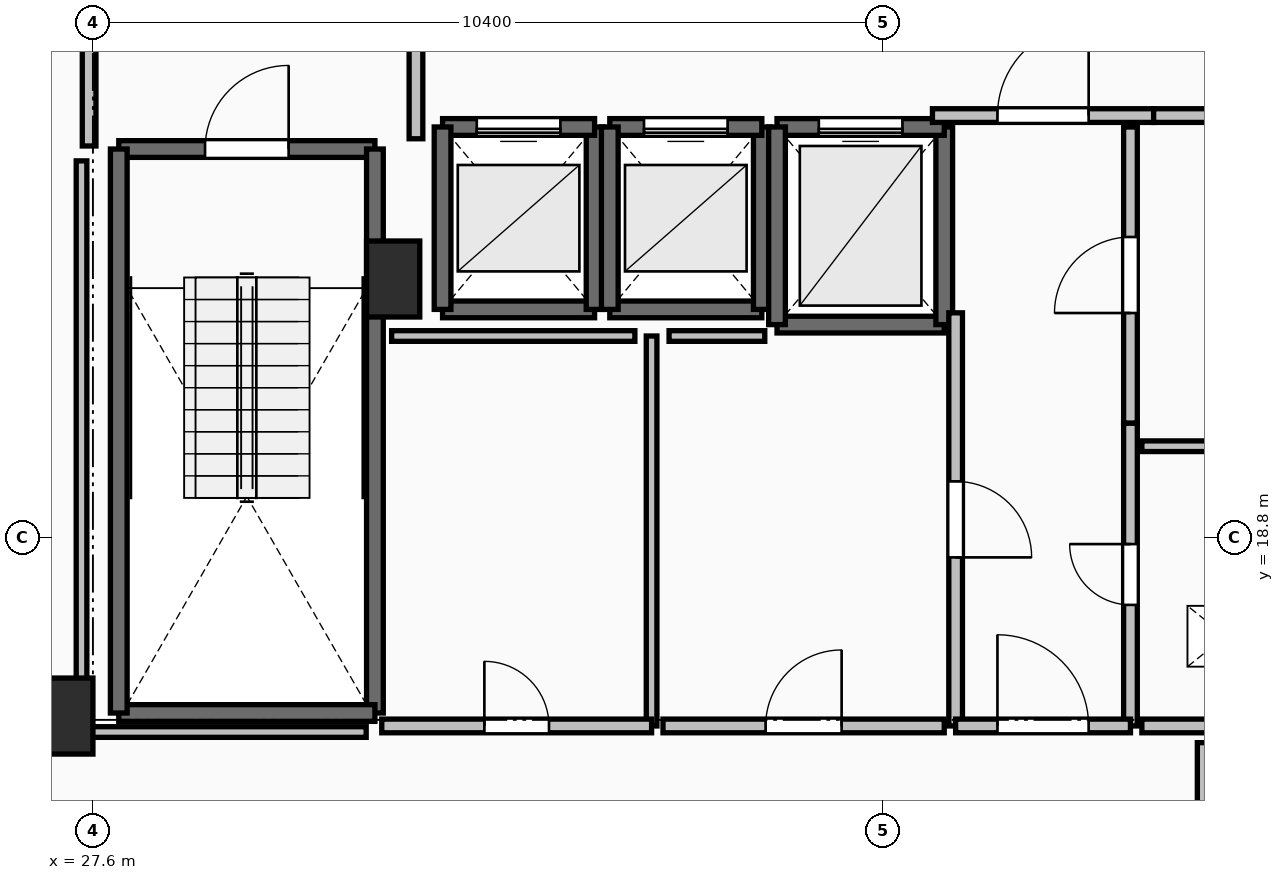
"""IFC4 building model, lengths in metres.
Left out: names, types, materials, properties, quantities, classifications, styles, units other than length and angle.
Written with IfcOpenShell. Run it as: python <this file> out.ifc"""

import sys

from ifc_helpers import new_model, si_unit, direction, frame, frame_2d, origin, origin_2d, place, context, subcontext, project, spatial, rectangle, extrude, element, fill, save


model = new_model("IFC4")
c1 = context("Model", 3, precision=1e-05, world=origin(), true_north=direction((0.0, 1.0)))
c2 = subcontext(c1, "Body", "Model", "MODEL_VIEW")
j1 = project(units=[si_unit("LENGTHUNIT", "METRE"), si_unit("PLANEANGLEUNIT", "RADIAN")], contexts=[c1])
p1 = place(None, origin())
s1 = spatial("IfcSite", under=j1, at=p1, CompositionType="ELEMENT")
p2 = place(p1, origin())
s2 = spatial("IfcBuilding", under=s1, at=p2, CompositionType="ELEMENT")
p3 = place(p2, frame((0.0, 0.0, 214.3)))
s3 = spatial("IfcBuildingStorey", under=s2, at=p3, CompositionType="ELEMENT", Elevation=214.3)
for number, where, z_axis, x_axis in (
    (1, (27.25, 16.45, 0.0), (0.0, 0.0, 1.0), (1.0, 0.0, 0.0)),
    (2, (31.55, 22.2, 0.0), (0.0, 0.0, 1.0), (1.0, 0.0, 0.0)),
):
    element("IfcColumn", number, at=place(p3, frame(where, z_axis=z_axis, x_axis=x_axis)), inside=s3, PredefinedType="PILASTER", context=c2, shape_type="SweptSolid", body=[
        extrude(rectangle(XDim=0.7, YDim=1.0, at=origin_2d()), origin(), (0.0, 0.0, 1.0), 3.55),
    ])
p4 = place(p3, frame((27.94, 23.91, 0.0), z_axis=(0.0, 0.0, 1.0), x_axis=(1.0, 0.0, 0.0)))
e3 = element("IfcWall", 3, at=p4, inside=s3, PredefinedType="SOLIDWALL", context=c2, shape_type="SweptSolid", body=[
    extrude(rectangle(XDim=3.37, YDim=0.22, at=frame_2d((1.685, 0.0))), origin(), (0.0, 0.0, 1.0), 3.29),
])
p5 = place(p4, frame((1.135, 0.0, 0.0)))
e4 = element("IfcOpeningElement", 4, at=p5, cuts=e3, PredefinedType="OPENING", context=c2, shape_type="SweptSolid", body=[
    extrude(rectangle(XDim=1.1, YDim=2.15, at=frame_2d((0.55, 1.075))), frame((0.0, 0.125, 0.0), z_axis=(0.0, -1.0, 0.0), x_axis=(1.0, 0.0, 0.0)), (0.0, 0.0, 1.0), 0.25),
])
p6 = place(p3, frame((31.31, 23.91, 0.0), z_axis=(0.0, 0.0, 1.0), x_axis=(0.0, -1.0, 0.0)))
e5 = element("IfcWall", 5, at=p6, inside=s3, PredefinedType="SOLIDWALL", context=c2, shape_type="SweptSolid", body=[
    extrude(rectangle(XDim=7.42, YDim=0.22, at=frame_2d((3.71, 0.0))), origin(), (0.0, 0.0, 1.0), 3.29),
])
p7 = place(p3, frame((31.31, 16.49, 0.0), z_axis=(0.0, 0.0, 1.0), x_axis=(-1.0, 0.0, 0.0)))
e6 = element("IfcWall", 6, at=p7, inside=s3, PredefinedType="SOLIDWALL", context=c2, shape_type="SweptSolid", body=[
    extrude(rectangle(XDim=3.37, YDim=0.22, at=frame_2d((1.685, 0.0))), origin(), (0.0, 0.0, 1.0), 3.29),
])
p8 = place(p3, frame((27.94, 16.49, 0.0), z_axis=(0.0, 0.0, 1.0), x_axis=(0.0, 1.0, 0.0)))
e7 = element("IfcWall", 7, at=p8, inside=s3, PredefinedType="SOLIDWALL", context=c2, shape_type="SweptSolid", body=[
    extrude(rectangle(XDim=7.42, YDim=0.22, at=frame_2d((3.71, 0.0))), origin(), (0.0, 0.0, 1.0), 3.29),
])
p9 = place(p3, frame((32.2, 21.8, 0.0), z_axis=(0.0, 0.0, 1.0), x_axis=(1.0, 0.0, 0.0)))
e8 = element("IfcWall", 8, at=p9, inside=s3, PredefinedType="SOLIDWALL", context=c2, shape_type="SweptSolid", body=[
    extrude(rectangle(XDim=2.0, YDim=0.22, at=frame_2d((1.0, 0.0))), origin(), (0.0, 0.0, 1.0), 3.29),
])
p10 = place(p3, frame((34.2, 21.8, 0.0), z_axis=(0.0, 0.0, 1.0), x_axis=(0.0, 1.0, 0.0)))
e9 = element("IfcWall", 9, at=p10, inside=s3, PredefinedType="SOLIDWALL", context=c2, shape_type="SweptSolid", body=[
    extrude(rectangle(XDim=2.4, YDim=0.22, at=frame_2d((1.2, 0.0))), origin(), (0.0, 0.0, 1.0), 3.29),
])
p11 = place(p3, frame((34.2, 24.2, 0.0), z_axis=(0.0, 0.0, 1.0), x_axis=(-1.0, 0.0, 0.0)))
e10 = element("IfcWall", 10, at=p11, inside=s3, PredefinedType="SOLIDWALL", context=c2, shape_type="SweptSolid", body=[
    extrude(rectangle(XDim=2.0, YDim=0.22, at=frame_2d((1.0, 0.0))), origin(), (0.0, 0.0, 1.0), 3.29),
])
p12 = place(p11, frame((0.45, 0.0, 0.0)))
e11 = element("IfcOpeningElement", 11, at=p12, cuts=e10, PredefinedType="OPENING", context=c2, shape_type="SweptSolid", body=[
    extrude(rectangle(XDim=1.1, YDim=2.2, at=frame_2d((0.55, 1.1))), frame((0.0, 0.125, 0.0), z_axis=(0.0, -1.0, 0.0), x_axis=(1.0, 0.0, 0.0)), (0.0, 0.0, 1.0), 0.25),
])
p13 = place(p3, frame((32.2, 24.2, 0.0), z_axis=(0.0, 0.0, 1.0), x_axis=(0.0, -1.0, 0.0)))
e12 = element("IfcWall", 12, at=p13, inside=s3, PredefinedType="SOLIDWALL", context=c2, shape_type="SweptSolid", body=[
    extrude(rectangle(XDim=2.4, YDim=0.22, at=frame_2d((1.2, 0.0))), origin(), (0.0, 0.0, 1.0), 3.29),
])
p14 = place(p3, frame((34.4, 21.8, 0.0), z_axis=(0.0, 0.0, 1.0), x_axis=(1.0, 0.0, 0.0)))
e13 = element("IfcWall", 13, at=p14, inside=s3, PredefinedType="SOLIDWALL", context=c2, shape_type="SweptSolid", body=[
    extrude(rectangle(XDim=2.0, YDim=0.22, at=frame_2d((1.0, 0.0))), origin(), (0.0, 0.0, 1.0), 3.29),
])
p15 = place(p3, frame((36.4, 21.8, 0.0), z_axis=(0.0, 0.0, 1.0), x_axis=(0.0, 1.0, 0.0)))
e14 = element("IfcWall", 14, at=p15, inside=s3, PredefinedType="SOLIDWALL", context=c2, shape_type="SweptSolid", body=[
    extrude(rectangle(XDim=2.4, YDim=0.22, at=frame_2d((1.2, 0.0))), origin(), (0.0, 0.0, 1.0), 3.29),
])
p16 = place(p3, frame((36.4, 24.2, 0.0), z_axis=(0.0, 0.0, 1.0), x_axis=(-1.0, 0.0, 0.0)))
e15 = element("IfcWall", 15, at=p16, inside=s3, PredefinedType="SOLIDWALL", context=c2, shape_type="SweptSolid", body=[
    extrude(rectangle(XDim=2.0, YDim=0.22, at=frame_2d((1.0, 0.0))), origin(), (0.0, 0.0, 1.0), 3.29),
])
p17 = place(p16, frame((0.45, 0.0, 0.0)))
e16 = element("IfcOpeningElement", 16, at=p17, cuts=e15, PredefinedType="OPENING", context=c2, shape_type="SweptSolid", body=[
    extrude(rectangle(XDim=1.1, YDim=2.2, at=frame_2d((0.55, 1.1))), frame((0.0, 0.125, 0.0), z_axis=(0.0, -1.0, 0.0), x_axis=(1.0, 0.0, 0.0)), (0.0, 0.0, 1.0), 0.25),
])
p18 = place(p3, frame((34.4, 24.2, 0.0), z_axis=(0.0, 0.0, 1.0), x_axis=(0.0, -1.0, 0.0)))
e17 = element("IfcWall", 17, at=p18, inside=s3, PredefinedType="SOLIDWALL", context=c2, shape_type="SweptSolid", body=[
    extrude(rectangle(XDim=2.4, YDim=0.22, at=frame_2d((1.2, 0.0))), origin(), (0.0, 0.0, 1.0), 3.29),
])
p19 = place(p3, frame((36.6, 21.6, 0.0), z_axis=(0.0, 0.0, 1.0), x_axis=(1.0, 0.0, 0.0)))
e18 = element("IfcWall", 18, at=p19, inside=s3, PredefinedType="SOLIDWALL", context=c2, shape_type="SweptSolid", body=[
    extrude(rectangle(XDim=2.2, YDim=0.22, at=frame_2d((1.1, 0.0))), origin(), (0.0, 0.0, 1.0), 3.29),
])
p20 = place(p3, frame((38.8, 21.6, 0.0), z_axis=(0.0, 0.0, 1.0), x_axis=(0.0, 1.0, 0.0)))
e19 = element("IfcWall", 19, at=p20, inside=s3, PredefinedType="SOLIDWALL", context=c2, shape_type="SweptSolid", body=[
    extrude(rectangle(XDim=2.6, YDim=0.22, at=frame_2d((1.3, 0.0))), origin(), (0.0, 0.0, 1.0), 3.29),
])
p21 = place(p3, frame((38.8, 24.2, 0.0), z_axis=(0.0, 0.0, 1.0), x_axis=(-1.0, 0.0, 0.0)))
e20 = element("IfcWall", 20, at=p21, inside=s3, PredefinedType="SOLIDWALL", context=c2, shape_type="SweptSolid", body=[
    extrude(rectangle(XDim=2.2, YDim=0.22, at=frame_2d((1.1, 0.0))), origin(), (0.0, 0.0, 1.0), 3.29),
])
p22 = place(p21, frame((0.55, 0.0, 0.0)))
e21 = element("IfcOpeningElement", 21, at=p22, cuts=e20, PredefinedType="OPENING", context=c2, shape_type="SweptSolid", body=[
    extrude(rectangle(XDim=1.1, YDim=2.2, at=frame_2d((0.55, 1.1))), frame((0.0, 0.125, 0.0), z_axis=(0.0, -1.0, 0.0), x_axis=(1.0, 0.0, 0.0)), (0.0, 0.0, 1.0), 0.25),
])
p23 = place(p3, frame((36.6, 24.2, 0.0), z_axis=(0.0, 0.0, 1.0), x_axis=(0.0, -1.0, 0.0)))
e22 = element("IfcWall", 22, at=p23, inside=s3, PredefinedType="SOLIDWALL", context=c2, shape_type="SweptSolid", body=[
    extrude(rectangle(XDim=2.6, YDim=0.22, at=frame_2d((1.3, 0.0))), origin(), (0.0, 0.0, 1.0), 3.29),
])
p24 = place(p3, frame((31.85, 24.045, 0.0), z_axis=(0.0, 0.0, 1.0), x_axis=(0.0, 1.0, 0.0)))
e23 = element("IfcWall", 23, at=p24, inside=s3, PredefinedType="PARTITIONING", context=c2, shape_type="SweptSolid", body=[
    extrude(rectangle(XDim=3.91, YDim=0.18, at=frame_2d((1.955, 0.0))), origin(), (0.0, 0.0, 1.0), 3.29),
])
p25 = place(p24, frame((1.355, 0.0, 0.0)))
e24 = element("IfcOpeningElement", 24, at=p25, cuts=e23, PredefinedType="OPENING", context=c2, shape_type="SweptSolid", body=[
    extrude(rectangle(XDim=1.2, YDim=2.15, at=frame_2d((0.6, 1.075))), frame((0.0, 0.105, 0.0), z_axis=(0.0, -1.0, 0.0), x_axis=(1.0, 0.0, 0.0)), (0.0, 0.0, 1.0), 0.21),
])
p26 = place(p3, frame((27.55, 28.0, 0.0), z_axis=(0.0, 0.0, 1.0), x_axis=(0.0, -1.0, 0.0)))
e25 = element("IfcWall", 25, at=p26, inside=s3, PredefinedType="PARTITIONING", context=c2, shape_type="SweptSolid", body=[
    extrude(rectangle(XDim=4.05, YDim=0.18, at=frame_2d((2.025, 0.0))), origin(), (0.0, 0.0, 1.0), 3.29),
])
p27 = place(p26, frame((1.425, 0.0, 0.0)))
e26 = element("IfcOpeningElement", 26, at=p27, cuts=e25, PredefinedType="OPENING", context=c2, shape_type="SweptSolid", body=[
    extrude(rectangle(XDim=1.2, YDim=2.15, at=frame_2d((0.6, 1.075))), frame((0.0, 0.105, 0.0), z_axis=(0.0, -1.0, 0.0), x_axis=(1.0, 0.0, 0.0)), (0.0, 0.0, 1.0), 0.21),
])
p28 = place(p3, frame((38.645, 24.35, 0.0), z_axis=(0.0, 0.0, 1.0), x_axis=(1.0, 0.0, 0.0)))
e27 = element("IfcWall", 27, at=p28, inside=s3, PredefinedType="PARTITIONING", context=c2, shape_type="SweptSolid", body=[
    extrude(rectangle(XDim=2.91, YDim=0.18, at=frame_2d((1.455, 0.0))), origin(), (0.0, 0.0, 1.0), 3.29),
])
p29 = place(p28, frame((0.855, 0.0, 0.0)))
e28 = element("IfcOpeningElement", 28, at=p29, cuts=e27, PredefinedType="OPENING", context=c2, shape_type="SweptSolid", body=[
    extrude(rectangle(XDim=1.2, YDim=2.15, at=frame_2d((0.6, 1.075))), frame((0.0, 0.105, 0.0), z_axis=(0.0, -1.0, 0.0), x_axis=(1.0, 0.0, 0.0)), (0.0, 0.0, 1.0), 0.21),
])
p30 = place(p3, frame((41.555, 24.35, 0.0), z_axis=(0.0, 0.0, 1.0), x_axis=(1.0, 0.0, 0.0)))
e29 = element("IfcWall", 29, at=p30, inside=s3, PredefinedType="PARTITIONING", context=c2, shape_type="SweptSolid", body=[
    extrude(rectangle(XDim=2.445, YDim=0.18, at=frame_2d((1.223, 0.0))), origin(), (0.0, 0.0, 1.0), 3.29),
])
p31 = place(p30, frame((0.722, 0.0, 0.0)))
e30 = element("IfcOpeningElement", 30, at=p31, cuts=e29, PredefinedType="OPENING", context=c2, shape_type="SweptSolid", body=[
    extrude(rectangle(XDim=1.0, YDim=2.15, at=frame_2d((0.5, 1.075))), frame((0.0, 0.105, 0.0), z_axis=(0.0, -1.0, 0.0), x_axis=(1.0, 0.0, 0.0)), (0.0, 0.0, 1.0), 0.21),
])
p32 = place(p3, frame((41.25, 16.32, 0.0), z_axis=(0.0, 0.0, 1.0), x_axis=(0.0, 1.0, 0.0)))
e31 = element("IfcWall", 31, at=p32, inside=s3, PredefinedType="PARTITIONING", context=c2, shape_type="SweptSolid", body=[
    extrude(rectangle(XDim=3.985, YDim=0.18, at=frame_2d((1.992, 0.0))), origin(), (0.0, 0.0, 1.0), 3.29),
])
p33 = place(p32, frame((1.593, 0.0, 0.0)))
e32 = element("IfcOpeningElement", 32, at=p33, cuts=e31, PredefinedType="OPENING", context=c2, shape_type="SweptSolid", body=[
    extrude(rectangle(XDim=0.8, YDim=2.05, at=frame_2d((0.4, 1.025))), frame((0.0, 0.105, 0.0), z_axis=(0.0, -1.0, 0.0), x_axis=(1.0, 0.0, 0.0)), (0.0, 0.0, 1.0), 0.21),
])
p34 = place(p3, frame((41.25, 20.305, 0.0), z_axis=(0.0, 0.0, 1.0), x_axis=(0.0, 1.0, 0.0)))
e33 = element("IfcWall", 33, at=p34, inside=s3, PredefinedType="PARTITIONING", context=c2, shape_type="SweptSolid", body=[
    extrude(rectangle(XDim=3.895, YDim=0.18, at=frame_2d((1.948, 0.0))), origin(), (0.0, 0.0, 1.0), 3.29),
])
p35 = place(p34, frame((1.448, 0.0, 0.0)))
e34 = element("IfcOpeningElement", 34, at=p35, cuts=e33, PredefinedType="OPENING", context=c2, shape_type="SweptSolid", body=[
    extrude(rectangle(XDim=1.0, YDim=2.15, at=frame_2d((0.5, 1.075))), frame((0.0, 0.105, 0.0), z_axis=(0.0, -1.0, 0.0), x_axis=(1.0, 0.0, 0.0)), (0.0, 0.0, 1.0), 0.21),
])
p36 = place(p3, frame((38.95, 21.755, 0.0), z_axis=(0.0, 0.0, 1.0), x_axis=(0.0, -1.0, 0.0)))
e35 = element("IfcWall", 35, at=p36, inside=s3, PredefinedType="PARTITIONING", context=c2, shape_type="SweptSolid", body=[
    extrude(rectangle(XDim=5.435, YDim=0.18, at=frame_2d((2.717, 0.0))), origin(), (0.0, 0.0, 1.0), 3.29),
])
p37 = place(p36, frame((2.218, 0.0, 0.0)))
e36 = element("IfcOpeningElement", 36, at=p37, cuts=e35, PredefinedType="OPENING", context=c2, shape_type="SweptSolid", body=[
    extrude(rectangle(XDim=1.0, YDim=2.15, at=frame_2d((0.5, 1.075))), frame((0.0, 0.105, 0.0), z_axis=(0.0, -1.0, 0.0), x_axis=(1.0, 0.0, 0.0)), (0.0, 0.0, 1.0), 0.21),
])
p38 = place(p3, frame((38.95, 16.32, 0.0), z_axis=(0.0, 0.0, 1.0), x_axis=(1.0, 0.0, 0.0)))
e37 = element("IfcWall", 37, at=p38, inside=s3, PredefinedType="PARTITIONING", context=c2, shape_type="SweptSolid", body=[
    extrude(rectangle(XDim=2.3, YDim=0.18, at=frame_2d((1.15, 0.0))), origin(), (0.0, 0.0, 1.0), 3.29),
])
p39 = place(p38, frame((0.55, 0.0, 0.0)))
e38 = element("IfcOpeningElement", 38, at=p39, cuts=e37, PredefinedType="OPENING", context=c2, shape_type="SweptSolid", body=[
    extrude(rectangle(XDim=1.2, YDim=2.15, at=frame_2d((0.6, 1.075))), frame((0.0, 0.105, 0.0), z_axis=(0.0, -1.0, 0.0), x_axis=(1.0, 0.0, 0.0)), (0.0, 0.0, 1.0), 0.21),
])
p40 = place(p3, frame((44.6, 20.0, 0.0), z_axis=(0.0, 0.0, 1.0), x_axis=(-1.0, 0.0, 0.0)))
e39 = element("IfcWall", 39, at=p40, inside=s3, PredefinedType="PARTITIONING", context=c2, shape_type="SweptSolid", body=[
    extrude(rectangle(XDim=3.2, YDim=0.14, at=frame_2d((1.6, 0.0))), origin(), (0.0, 0.0, 1.0), 3.29),
])
p41 = place(p3, frame((41.4, 16.32, 0.0), z_axis=(0.0, 0.0, 1.0), x_axis=(1.0, 0.0, 0.0)))
e40 = element("IfcWall", 40, at=p41, inside=s3, PredefinedType="PARTITIONING", context=c2, shape_type="SweptSolid", body=[
    extrude(rectangle(XDim=3.2, YDim=0.18, at=frame_2d((1.6, 0.0))), origin(), (0.0, 0.0, 1.0), 3.29),
])
p42 = place(p41, frame((1.2, 0.0, 0.0)))
e41 = element("IfcOpeningElement", 41, at=p42, cuts=e40, PredefinedType="OPENING", context=c2, shape_type="SweptSolid", body=[
    extrude(rectangle(XDim=0.8, YDim=2.05, at=frame_2d((0.4, 1.025))), frame((0.0, 0.105, 0.0), z_axis=(0.0, -1.0, 0.0), x_axis=(1.0, 0.0, 0.0)), (0.0, 0.0, 1.0), 0.21),
])
p43 = place(p3, frame((34.95, 16.32, 0.0), z_axis=(0.0, 0.0, 1.0), x_axis=(0.0, 1.0, 0.0)))
e42 = element("IfcWall", 42, at=p43, inside=s3, PredefinedType="PARTITIONING", context=c2, shape_type="SweptSolid", body=[
    extrude(rectangle(XDim=5.13, YDim=0.14, at=frame_2d((2.565, 0.0))), origin(), (0.0, 0.0, 1.0), 3.29),
])
p44 = place(p3, frame((31.4, 16.32, 0.0), z_axis=(0.0, 0.0, 1.0), x_axis=(1.0, 0.0, 0.0)))
e43 = element("IfcWall", 43, at=p44, inside=s3, PredefinedType="PARTITIONING", context=c2, shape_type="SweptSolid", body=[
    extrude(rectangle(XDim=3.55, YDim=0.18, at=frame_2d((1.775, 0.0))), origin(), (0.0, 0.0, 1.0), 3.29),
])
p45 = place(p44, frame((1.35, 0.0, 0.0)))
e44 = element("IfcOpeningElement", 44, at=p45, cuts=e43, PredefinedType="OPENING", context=c2, shape_type="SweptSolid", body=[
    extrude(rectangle(XDim=0.85, YDim=2.1, at=frame_2d((0.425, 1.05))), frame((0.0, 0.105, 0.0), z_axis=(0.0, -1.0, 0.0), x_axis=(1.0, 0.0, 0.0)), (0.0, 0.0, 1.0), 0.21),
])
p46 = place(p3, frame((35.1, 16.32, 0.0), z_axis=(0.0, 0.0, 1.0), x_axis=(1.0, 0.0, 0.0)))
e45 = element("IfcWall", 45, at=p46, inside=s3, PredefinedType="PARTITIONING", context=c2, shape_type="SweptSolid", body=[
    extrude(rectangle(XDim=3.7, YDim=0.18, at=frame_2d((1.85, 0.0))), origin(), (0.0, 0.0, 1.0), 3.29),
])
p47 = place(p46, frame((1.35, 0.0, 0.0)))
e46 = element("IfcOpeningElement", 46, at=p47, cuts=e45, PredefinedType="OPENING", context=c2, shape_type="SweptSolid", body=[
    extrude(rectangle(XDim=1.0, YDim=2.15, at=frame_2d((0.5, 1.075))), frame((0.0, 0.105, 0.0), z_axis=(0.0, -1.0, 0.0), x_axis=(1.0, 0.0, 0.0)), (0.0, 0.0, 1.0), 0.21),
])
p48 = place(p3, frame((34.73, 21.45, 0.0), z_axis=(0.0, 0.0, 1.0), x_axis=(-1.0, 0.0, 0.0)))
e47 = element("IfcWall", 47, at=p48, inside=s3, PredefinedType="PARTITIONING", context=c2, shape_type="SweptSolid", body=[
    extrude(rectangle(XDim=3.2, YDim=0.14, at=frame_2d((1.6, 0.0))), origin(), (0.0, 0.0, 1.0), 3.29),
])
p49 = place(p3, frame((36.439, 21.45, 0.0), z_axis=(0.0, 0.0, 1.0), x_axis=(-1.0, 0.0, 0.0)))
e48 = element("IfcWall", 48, at=p49, inside=s3, PredefinedType="PARTITIONING", context=c2, shape_type="SweptSolid", body=[
    extrude(rectangle(XDim=1.259, YDim=0.14, at=frame_2d((0.629, 0.0))), origin(), (0.0, 0.0, 1.0), 3.29),
])
p50 = place(p3, frame((27.45, 23.754, 0.0), z_axis=(0.0, 0.0, 1.0), x_axis=(0.0, -1.0, 0.0)))
e49 = element("IfcWall", 49, at=p50, inside=s3, PredefinedType="PARTITIONING", context=c2, shape_type="SweptSolid", body=[
    extrude(rectangle(XDim=7.514, YDim=0.14, at=frame_2d((3.757, 0.0))), origin(), (0.0, 0.0, 1.0), 2.482),
])
p51 = place(p3, frame((27.45, 16.24, 0.0), z_axis=(0.0, 0.0, 1.0), x_axis=(1.0, 0.0, 0.0)))
e50 = element("IfcWall", 50, at=p51, inside=s3, PredefinedType="PARTITIONING", context=c2, shape_type="SweptSolid", body=[
    extrude(rectangle(XDim=3.745, YDim=0.14, at=frame_2d((1.873, 0.0))), origin(), (0.0, 0.0, 1.0), 2.482),
])
p52 = place(p3, frame((42.2, 16.1, 0.0), z_axis=(0.0, 0.0, 1.0), x_axis=(0.0, -1.0, 0.0)))
e51 = element("IfcWall", 51, at=p52, inside=s3, PredefinedType="PARTITIONING", context=c2, shape_type="SweptSolid", body=[
    extrude(rectangle(XDim=1.83, YDim=0.14, at=frame_2d((0.915, 0.0))), origin(), (0.0, 0.0, 1.0), 2.979),
])
p53 = place(p5, origin())
e52 = element("IfcDoor", 52, at=p53, inside=s3, OperationType="SINGLE_SWING_RIGHT", PredefinedType="DOOR", context=c2, shape_type="SweptSolid", body=[
    extrude(rectangle(XDim=1.1, YDim=2.15, at=frame_2d((0.55, 1.075))), frame((0.0, 0.025, 0.0), z_axis=(0.0, -1.0, 0.0), x_axis=(1.0, 0.0, 0.0)), (0.0, 0.0, 1.0), 0.05),
])
fill(e4, e52)
p54 = place(p12, origin())
e53 = element("IfcDoor", 53, at=p54, inside=s3, OperationType="SLIDING_TO_LEFT", PredefinedType="DOOR", context=c2, shape_type="SweptSolid", body=[
    extrude(rectangle(XDim=1.1, YDim=2.2, at=frame_2d((0.55, 1.1))), frame((0.0, 0.025, 0.0), z_axis=(0.0, -1.0, 0.0), x_axis=(1.0, 0.0, 0.0)), (0.0, 0.0, 1.0), 0.05),
])
fill(e11, e53)
p55 = place(p17, origin())
e54 = element("IfcDoor", 54, at=p55, inside=s3, OperationType="SLIDING_TO_LEFT", PredefinedType="DOOR", context=c2, shape_type="SweptSolid", body=[
    extrude(rectangle(XDim=1.1, YDim=2.2, at=frame_2d((0.55, 1.1))), frame((0.0, 0.025, 0.0), z_axis=(0.0, -1.0, 0.0), x_axis=(1.0, 0.0, 0.0)), (0.0, 0.0, 1.0), 0.05),
])
fill(e16, e54)
p56 = place(p22, origin())
e55 = element("IfcDoor", 55, at=p56, inside=s3, OperationType="SLIDING_TO_LEFT", PredefinedType="DOOR", context=c2, shape_type="SweptSolid", body=[
    extrude(rectangle(XDim=1.1, YDim=2.2, at=frame_2d((0.55, 1.1))), frame((0.0, 0.025, 0.0), z_axis=(0.0, -1.0, 0.0), x_axis=(1.0, 0.0, 0.0)), (0.0, 0.0, 1.0), 0.05),
])
fill(e21, e55)
p57 = place(p29, origin())
e56 = element("IfcDoor", 56, at=p57, inside=s3, OperationType="SINGLE_SWING_RIGHT", PredefinedType="DOOR", context=c2, shape_type="SweptSolid", body=[
    extrude(rectangle(XDim=1.2, YDim=2.15, at=frame_2d((0.6, 1.075))), frame((0.0, 0.025, 0.0), z_axis=(0.0, -1.0, 0.0), x_axis=(1.0, 0.0, 0.0)), (0.0, 0.0, 1.0), 0.05),
])
fill(e28, e56)
p58 = place(p33, origin())
e57 = element("IfcDoor", 57, at=p58, inside=s3, OperationType="SINGLE_SWING_RIGHT", PredefinedType="DOOR", context=c2, shape_type="SweptSolid", body=[
    extrude(rectangle(XDim=0.8, YDim=2.05, at=frame_2d((0.4, 1.025))), frame((0.0, 0.025, 0.0), z_axis=(0.0, -1.0, 0.0), x_axis=(1.0, 0.0, 0.0)), (0.0, 0.0, 1.0), 0.05),
])
fill(e32, e57)
p59 = place(p35, origin())
e58 = element("IfcDoor", 58, at=p59, inside=s3, OperationType="SINGLE_SWING_LEFT", PredefinedType="DOOR", context=c2, shape_type="SweptSolid", body=[
    extrude(rectangle(XDim=1.0, YDim=2.15, at=frame_2d((0.5, 1.075))), frame((0.0, 0.025, 0.0), z_axis=(0.0, -1.0, 0.0), x_axis=(1.0, 0.0, 0.0)), (0.0, 0.0, 1.0), 0.05),
])
fill(e34, e58)
p60 = place(p37, origin())
e59 = element("IfcDoor", 59, at=p60, inside=s3, OperationType="SINGLE_SWING_RIGHT", PredefinedType="DOOR", context=c2, shape_type="SweptSolid", body=[
    extrude(rectangle(XDim=1.0, YDim=2.15, at=frame_2d((0.5, 1.075))), frame((0.0, 0.025, 0.0), z_axis=(0.0, -1.0, 0.0), x_axis=(1.0, 0.0, 0.0)), (0.0, 0.0, 1.0), 0.05),
])
fill(e36, e59)
p61 = place(p39, origin())
e60 = element("IfcDoor", 60, at=p61, inside=s3, OperationType="SINGLE_SWING_LEFT", PredefinedType="DOOR", context=c2, shape_type="SweptSolid", body=[
    extrude(rectangle(XDim=1.2, YDim=2.15, at=frame_2d((0.6, 1.075))), frame((0.0, 0.025, 0.0), z_axis=(0.0, -1.0, 0.0), x_axis=(1.0, 0.0, 0.0)), (0.0, 0.0, 1.0), 0.05),
])
fill(e38, e60)
p62 = place(p45, origin())
e61 = element("IfcDoor", 61, at=p62, inside=s3, OperationType="SINGLE_SWING_LEFT", PredefinedType="DOOR", context=c2, shape_type="SweptSolid", body=[
    extrude(rectangle(XDim=0.85, YDim=2.1, at=frame_2d((0.425, 1.05))), frame((0.0, 0.025, 0.0), z_axis=(0.0, -1.0, 0.0), x_axis=(1.0, 0.0, 0.0)), (0.0, 0.0, 1.0), 0.05),
])
fill(e44, e61)
p63 = place(p47, origin())
e62 = element("IfcDoor", 62, at=p63, inside=s3, OperationType="SINGLE_SWING_RIGHT", PredefinedType="DOOR", context=c2, shape_type="SweptSolid", body=[
    extrude(rectangle(XDim=1.0, YDim=2.15, at=frame_2d((0.5, 1.075))), frame((0.0, 0.025, 0.0), z_axis=(0.0, -1.0, 0.0), x_axis=(1.0, 0.0, 0.0)), (0.0, 0.0, 1.0), 0.05),
])
fill(e46, e62)
save(model, sys.argv[1])
